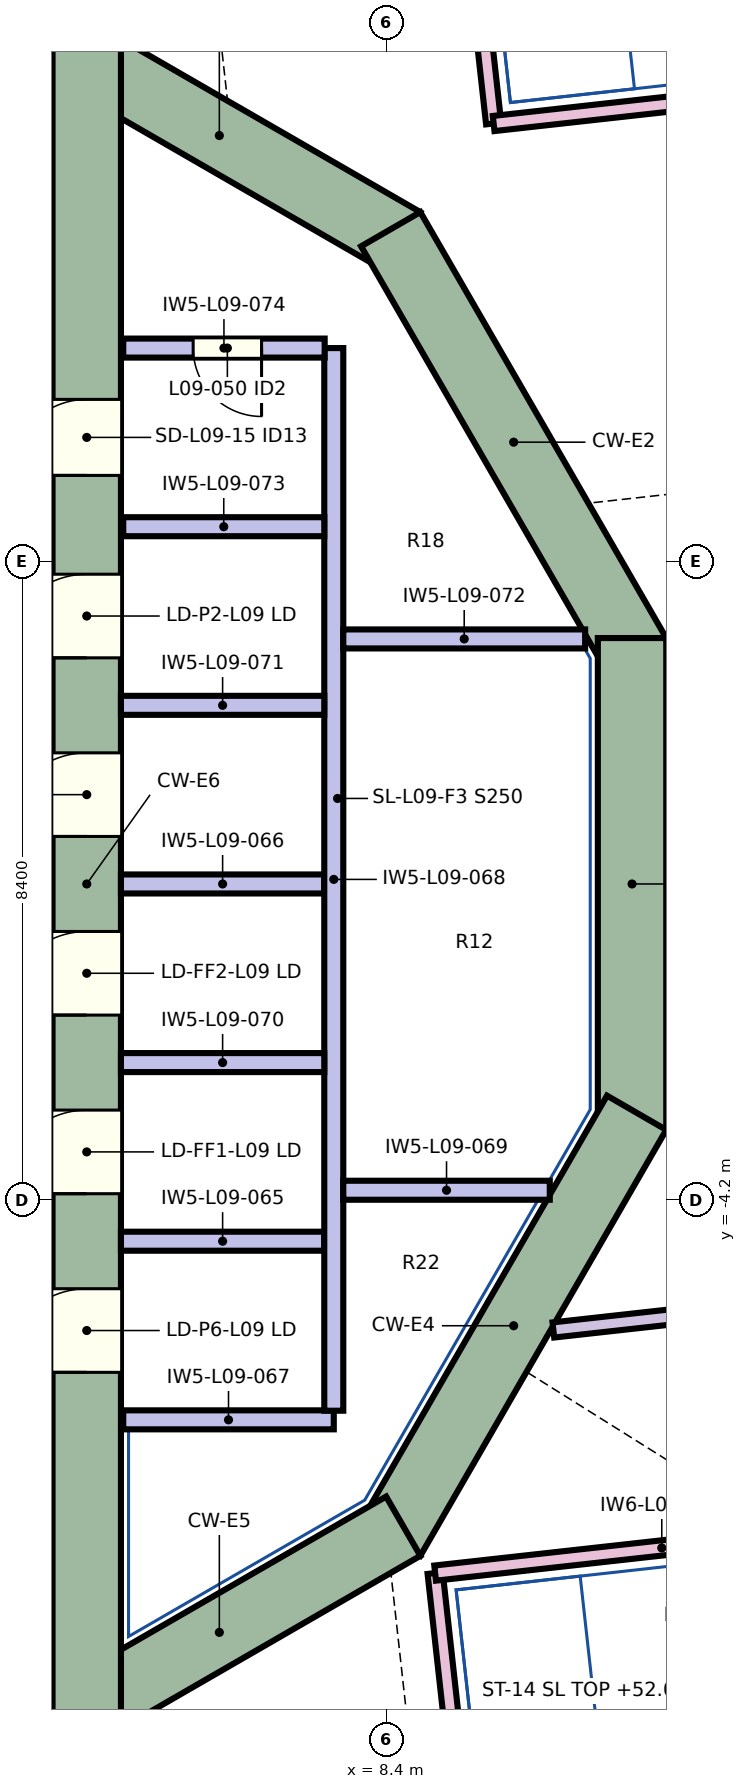
"""IFC4 building model, lengths in metres.
Left out: names, types, materials, properties, quantities, classifications, styles, units other than length and angle.
Written with IfcOpenShell. Run it as: python <this file> out.ifc"""

import sys

from ifc_helpers import new_model, si_unit, direction, frame, frame_2d, origin, place, context, subcontext, project, spatial, rectangle, extrude, element, fill, save


model = new_model("IFC4")
c1 = context("Model", 3, precision=1e-05, world=origin(), true_north=direction((0.0, 1.0)))
c2 = subcontext(c1, "Body", "Model", "MODEL_VIEW")
j1 = project(units=[si_unit("LENGTHUNIT", "METRE"), si_unit("PLANEANGLEUNIT", "RADIAN")], contexts=[c1])
p1 = place(None, origin())
s1 = spatial("IfcSite", under=j1, at=p1, CompositionType="ELEMENT")
p2 = place(p1, origin())
s2 = spatial("IfcBuilding", under=s1, at=p2, CompositionType="ELEMENT")
p3 = place(p2, frame((0.0, 0.0, 50.1)))
s3 = spatial("IfcBuildingStorey", under=s2, at=p3, CompositionType="ELEMENT", Elevation=50.1)
p4 = place(p3, frame((3.775, 11.243, 0.0), z_axis=(0.0, 0.0, 1.0), x_axis=(0.866026961591, -0.49999730179, 0.0)))
e1 = element("IfcWall", 1, at=p4, inside=s3, PredefinedType="SHEAR", context=c2, shape_type="SweptSolid", body=[
    extrude(rectangle(XDim=5.587, YDim=0.9, at=frame_2d((2.794, 0.0))), origin(), (0.0, 0.0, 1.0), 3.8),
])
p5 = place(p3, frame((8.449, 8.614, 0.0), z_axis=(0.0, 0.0, 1.0), x_axis=(0.499990282633, -0.866031014036, 0.0)))
e2 = element("IfcWall", 2, at=p5, inside=s3, PredefinedType="SHEAR", context=c2, shape_type="SweptSolid", body=[
    extrude(rectangle(XDim=6.47, YDim=0.9, at=frame_2d((3.235, 0.0))), origin(), (0.0, 0.0, 1.0), 3.8),
])
p6 = place(p3, frame((11.624, 3.235, 0.0), z_axis=(0.0, 0.0, 1.0), x_axis=(0.0, -1.0, 0.0)))
e3 = element("IfcWall", 3, at=p6, inside=s3, PredefinedType="SHEAR", context=c2, shape_type="SweptSolid", body=[
    extrude(rectangle(XDim=6.471, YDim=0.9, at=frame_2d((3.235, 0.0))), origin(), (0.0, 0.0, 1.0), 3.8),
])
p7 = place(p3, frame((11.684, -3.01, 0.0), z_axis=(0.0, 0.0, 1.0), x_axis=(-0.499990282633, -0.866031014036, 0.0)))
e4 = element("IfcWall", 4, at=p7, inside=s3, PredefinedType="SHEAR", context=c2, shape_type="SweptSolid", body=[
    extrude(rectangle(XDim=6.47, YDim=0.9, at=frame_2d((3.235, 0.0))), origin(), (0.0, 0.0, 1.0), 3.8),
])
p8 = place(p3, frame((8.614, -8.449, 0.0), z_axis=(0.0, 0.0, 1.0), x_axis=(-0.866026961591, -0.49999730179, 0.0)))
e5 = element("IfcWall", 5, at=p8, inside=s3, PredefinedType="SHEAR", context=c2, shape_type="SweptSolid", body=[
    extrude(rectangle(XDim=5.587, YDim=0.9, at=frame_2d((2.794, 0.0))), origin(), (0.0, 0.0, 1.0), 3.8),
])
p9 = place(p3, frame((4.45, -11.633, 0.0), z_axis=(0.0, 0.0, 1.0), x_axis=(0.0, 1.0, 0.0)))
e6 = element("IfcWall", 6, at=p9, inside=s3, PredefinedType="SHEAR", context=c2, shape_type="SweptSolid", body=[
    extrude(rectangle(XDim=23.265, YDim=0.9, at=frame_2d((11.633, 0.0))), origin(), (0.0, 0.0, 1.0), 3.8),
])
p10 = place(p9, frame((7.558, 0.0, 0.0)))
e7 = element("IfcOpeningElement", 7, at=p10, cuts=e6, PredefinedType="OPENING", context=c2, shape_type="SweptSolid", body=[
    extrude(rectangle(XDim=1.1, YDim=2.1, at=frame_2d((0.55, 1.05))), frame((0.0, 0.46, 0.0), z_axis=(0.0, -1.0, 0.0), x_axis=(1.0, 0.0, 0.0)), (0.0, 0.0, 1.0), 0.92),
])
p11 = place(p9, frame((9.907, 0.0, 0.0)))
e8 = element("IfcOpeningElement", 8, at=p11, cuts=e6, PredefinedType="OPENING", context=c2, shape_type="SweptSolid", body=[
    extrude(rectangle(XDim=1.1, YDim=2.1, at=frame_2d((0.55, 1.05))), frame((0.0, 0.46, 0.0), z_axis=(0.0, -1.0, 0.0), x_axis=(1.0, 0.0, 0.0)), (0.0, 0.0, 1.0), 0.92),
])
p12 = place(p9, frame((12.258, 0.0, 0.0)))
e9 = element("IfcOpeningElement", 9, at=p12, cuts=e6, PredefinedType="OPENING", context=c2, shape_type="SweptSolid", body=[
    extrude(rectangle(XDim=1.1, YDim=2.1, at=frame_2d((0.55, 1.05))), frame((0.0, 0.46, 0.0), z_axis=(0.0, -1.0, 0.0), x_axis=(1.0, 0.0, 0.0)), (0.0, 0.0, 1.0), 0.92),
])
p13 = place(p9, frame((14.607, 0.0, 0.0)))
e10 = element("IfcOpeningElement", 10, at=p13, cuts=e6, PredefinedType="OPENING", context=c2, shape_type="SweptSolid", body=[
    extrude(rectangle(XDim=1.1, YDim=2.1, at=frame_2d((0.55, 1.05))), frame((0.0, 0.46, 0.0), z_axis=(0.0, -1.0, 0.0), x_axis=(1.0, 0.0, 0.0)), (0.0, 0.0, 1.0), 0.92),
])
p14 = place(p9, frame((5.208, 0.0, 0.0)))
e11 = element("IfcOpeningElement", 11, at=p14, cuts=e6, PredefinedType="OPENING", context=c2, shape_type="SweptSolid", body=[
    extrude(rectangle(XDim=1.1, YDim=2.1, at=frame_2d((0.55, 1.05))), frame((0.0, 0.46, 0.0), z_axis=(0.0, -1.0, 0.0), x_axis=(1.0, 0.0, 0.0)), (0.0, 0.0, 1.0), 0.92),
])
p15 = place(p9, frame((17.008, 0.0, 0.0)))
e12 = element("IfcOpeningElement", 12, at=p15, cuts=e6, PredefinedType="OPENING", context=c2, shape_type="SweptSolid", body=[
    extrude(rectangle(XDim=1.0, YDim=2.1, at=frame_2d((0.5, 1.05))), frame((0.0, 0.46, 0.0), z_axis=(0.0, -1.0, 0.0), x_axis=(1.0, 0.0, 0.0)), (0.0, 0.0, 1.0), 0.92),
])
for number, where, z_axis, x_axis in (
    (13, (4.9, -4.7, 0.0), (0.0, 0.0, 1.0), (1.0, 0.0, 0.0)),
    (14, (4.9, 0.0, 0.0), (0.0, 0.0, 1.0), (1.0, 0.0, 0.0)),
):
    element("IfcWall", number, at=place(p3, frame(where, z_axis=z_axis, x_axis=x_axis)), inside=s3, PredefinedType="SOLIDWALL", context=c2, shape_type="SweptSolid", body=[
        extrude(rectangle(XDim=2.675, YDim=0.25, at=frame_2d((1.337, 0.0))), origin(), (0.0, 0.0, 1.0), 3.55),
    ])
p16 = place(p3, frame((4.93, -7.05, 0.0), z_axis=(0.0, 0.0, 1.0), x_axis=(1.0, 0.0, 0.0)))
e15 = element("IfcWall", 15, at=p16, inside=s3, PredefinedType="SOLIDWALL", context=c2, shape_type="SweptSolid", body=[
    extrude(rectangle(XDim=2.77, YDim=0.25, at=frame_2d((1.385, 0.0))), origin(), (0.0, 0.0, 1.0), 3.55),
])
p17 = place(p3, frame((7.7, -6.93, 0.0), z_axis=(0.0, 0.0, 1.0), x_axis=(0.0, 1.0, 0.0)))
e16 = element("IfcWall", 16, at=p17, inside=s3, PredefinedType="SOLIDWALL", context=c2, shape_type="SweptSolid", body=[
    extrude(rectangle(XDim=13.98, YDim=0.25, at=frame_2d((6.99, 0.0))), origin(), (0.0, 0.0, 1.0), 3.55),
])
p18 = place(p3, frame((7.825, -4.03, 0.0), z_axis=(0.0, 0.0, 1.0), x_axis=(1.0, 0.0, 0.0)))
e17 = element("IfcWall", 17, at=p18, inside=s3, PredefinedType="SOLIDWALL", context=c2, shape_type="SweptSolid", body=[
    extrude(rectangle(XDim=2.717, YDim=0.25, at=frame_2d((1.358, 0.0))), origin(), (0.0, 0.0, 1.0), 3.55),
])
for number, where, z_axis, x_axis in (
    (18, (7.575, -2.35, 0.0), (0.0, 0.0, 1.0), (-1.0, 0.0, 0.0)),
    (19, (7.575, 2.35, 0.0), (0.0, 0.0, 1.0), (-1.0, 0.0, 0.0)),
):
    element("IfcWall", number, at=place(p3, frame(where, z_axis=z_axis, x_axis=x_axis)), inside=s3, PredefinedType="SOLIDWALL", context=c2, shape_type="SweptSolid", body=[
        extrude(rectangle(XDim=2.675, YDim=0.25, at=frame_2d((1.337, 0.0))), origin(), (0.0, 0.0, 1.0), 3.55),
    ])
p19 = place(p3, frame((7.825, 3.224, 0.0), z_axis=(0.0, 0.0, 1.0), x_axis=(1.0, 0.0, 0.0)))
e20 = element("IfcWall", 20, at=p19, inside=s3, PredefinedType="SOLIDWALL", context=c2, shape_type="SweptSolid", body=[
    extrude(rectangle(XDim=3.182, YDim=0.25, at=frame_2d((1.591, 0.0))), origin(), (0.0, 0.0, 1.0), 3.55),
])
p20 = place(p3, frame((7.575, 4.7, 0.0), z_axis=(0.0, 0.0, 1.0), x_axis=(-1.0, 0.0, 0.0)))
e21 = element("IfcWall", 21, at=p20, inside=s3, PredefinedType="SOLIDWALL", context=c2, shape_type="SweptSolid", body=[
    extrude(rectangle(XDim=2.645, YDim=0.25, at=frame_2d((1.323, 0.0))), origin(), (0.0, 0.0, 1.0), 3.55),
])
p21 = place(p3, frame((7.58, 7.05, 0.0), z_axis=(0.0, 0.0, 1.0), x_axis=(-1.0, 0.0, 0.0)))
e22 = element("IfcWall", 22, at=p21, inside=s3, PredefinedType="SOLIDWALL", context=c2, shape_type="SweptSolid", body=[
    extrude(rectangle(XDim=2.65, YDim=0.25, at=frame_2d((1.325, 0.0))), origin(), (0.0, 0.0, 1.0), 3.55),
])
p22 = place(p21, frame((0.83, 0.0, 0.0)))
e23 = element("IfcOpeningElement", 23, at=p22, cuts=e22, PredefinedType="OPENING", context=c2, shape_type="SweptSolid", body=[
    extrude(rectangle(XDim=0.9, YDim=2.1, at=frame_2d((0.45, 1.05))), frame((0.0, 0.135, 0.0), z_axis=(0.0, -1.0, 0.0), x_axis=(1.0, 0.0, 0.0)), (0.0, 0.0, 1.0), 0.27),
])
p23 = place(p3, frame((9.033, -9.066, 0.0), z_axis=(0.0, 0.0, 1.0), x_axis=(0.11030110325, -0.993898217436, 0.0)))
e24 = element("IfcWall", 24, at=p23, inside=s3, PredefinedType="SOLIDWALL", context=c2, shape_type="SweptSolid", body=[
    extrude(rectangle(XDim=3.493, YDim=0.2, at=frame_2d((1.746, 0.0))), origin(), (0.0, 0.0, 1.0), 3.55),
])
p24 = place(p3, frame((9.434, 13.334, 0.0), z_axis=(0.0, 0.0, 1.0), x_axis=(0.11027153821, -0.993901498067, 0.0)))
e25 = element("IfcWall", 25, at=p24, inside=s3, PredefinedType="SOLIDWALL", context=c2, shape_type="SweptSolid", body=[
    extrude(rectangle(XDim=3.35, YDim=0.2, at=frame_2d((1.675, 0.0))), origin(), (0.0, 0.0, 1.0), 3.55),
])
p25 = place(p3, frame((9.803, 10.004, 0.0), z_axis=(0.0, 0.0, 1.0), x_axis=(0.993897498792, 0.11030757859, 0.0)))
e26 = element("IfcWall", 26, at=p25, inside=s3, PredefinedType="SOLIDWALL", context=c2, shape_type="SweptSolid", body=[
    extrude(rectangle(XDim=6.053, YDim=0.2, at=frame_2d((3.027, 0.0))), origin(), (0.0, 0.0, 1.0), 3.55),
])
p26 = place(p3, frame((14.997, -8.404, 0.0), z_axis=(0.0, 0.0, 1.0), x_axis=(-0.993897125329, -0.110310943534, 0.0)))
e27 = element("IfcWall", 27, at=p26, inside=s3, PredefinedType="SOLIDWALL", context=c2, shape_type="SweptSolid", body=[
    extrude(rectangle(XDim=6.0, YDim=0.2, at=frame_2d((3.0, 0.0))), origin(), (0.0, 0.0, 1.0), 3.55),
])
p27 = place(p3, frame((17.47, -5.104, 0.0), z_axis=(0.0, 0.0, 1.0), x_axis=(-0.993897488751, -0.110307669061, 0.0)))
e28 = element("IfcWall", 28, at=p27, inside=s3, PredefinedType="PARTITIONING", context=c2, shape_type="SweptSolid", body=[
    extrude(rectangle(XDim=6.923, YDim=0.2, at=frame_2d((3.461, 0.0))), origin(), (0.0, 0.0, 1.0), 3.55),
])
p28 = place(p22, origin())
e29 = element("IfcDoor", 29, at=p28, inside=s3, OperationType="NOTDEFINED", PredefinedType="DOOR", context=c2, shape_type="SweptSolid", body=[
    extrude(rectangle(XDim=0.9, YDim=2.1, at=frame_2d((0.45, 1.05))), frame((0.0, 0.025, 0.0), z_axis=(0.0, -1.0, 0.0), x_axis=(1.0, 0.0, 0.0)), (0.0, 0.0, 1.0), 0.05),
])
fill(e23, e29)
p29 = place(p10, origin())
e30 = element("IfcDoor", 30, at=p29, inside=s3, OperationType="SLIDING_TO_LEFT", PredefinedType="DOOR", context=c2, shape_type="SweptSolid", body=[
    extrude(rectangle(XDim=1.1, YDim=2.1, at=frame_2d((0.55, 1.05))), frame((0.0, 0.025, 0.0), z_axis=(0.0, -1.0, 0.0), x_axis=(1.0, 0.0, 0.0)), (0.0, 0.0, 1.0), 0.05),
])
fill(e7, e30)
p30 = place(p11, origin())
e31 = element("IfcDoor", 31, at=p30, inside=s3, OperationType="SLIDING_TO_LEFT", PredefinedType="DOOR", context=c2, shape_type="SweptSolid", body=[
    extrude(rectangle(XDim=1.1, YDim=2.1, at=frame_2d((0.55, 1.05))), frame((0.0, 0.025, 0.0), z_axis=(0.0, -1.0, 0.0), x_axis=(1.0, 0.0, 0.0)), (0.0, 0.0, 1.0), 0.05),
])
fill(e8, e31)
p31 = place(p12, origin())
e32 = element("IfcDoor", 32, at=p31, inside=s3, OperationType="SLIDING_TO_LEFT", PredefinedType="DOOR", context=c2, shape_type="SweptSolid", body=[
    extrude(rectangle(XDim=1.1, YDim=2.1, at=frame_2d((0.55, 1.05))), frame((0.0, 0.025, 0.0), z_axis=(0.0, -1.0, 0.0), x_axis=(1.0, 0.0, 0.0)), (0.0, 0.0, 1.0), 0.05),
])
fill(e9, e32)
p32 = place(p13, origin())
e33 = element("IfcDoor", 33, at=p32, inside=s3, OperationType="SLIDING_TO_LEFT", PredefinedType="DOOR", context=c2, shape_type="SweptSolid", body=[
    extrude(rectangle(XDim=1.1, YDim=2.1, at=frame_2d((0.55, 1.05))), frame((0.0, 0.025, 0.0), z_axis=(0.0, -1.0, 0.0), x_axis=(1.0, 0.0, 0.0)), (0.0, 0.0, 1.0), 0.05),
])
fill(e10, e33)
p33 = place(p14, origin())
e34 = element("IfcDoor", 34, at=p33, inside=s3, OperationType="SLIDING_TO_LEFT", PredefinedType="DOOR", context=c2, shape_type="SweptSolid", body=[
    extrude(rectangle(XDim=1.1, YDim=2.1, at=frame_2d((0.55, 1.05))), frame((0.0, 0.025, 0.0), z_axis=(0.0, -1.0, 0.0), x_axis=(1.0, 0.0, 0.0)), (0.0, 0.0, 1.0), 0.05),
])
fill(e11, e34)
p34 = place(p15, origin())
e35 = element("IfcDoor", 35, at=p34, inside=s3, OperationType="NOTDEFINED", PredefinedType="DOOR", context=c2, shape_type="SweptSolid", body=[
    extrude(rectangle(XDim=1.0, YDim=2.1, at=frame_2d((0.5, 1.05))), frame((0.0, 0.025, 0.0), z_axis=(0.0, -1.0, 0.0), x_axis=(1.0, 0.0, 0.0)), (0.0, 0.0, 1.0), 0.05),
])
fill(e12, e35)
save(model, sys.argv[1])
